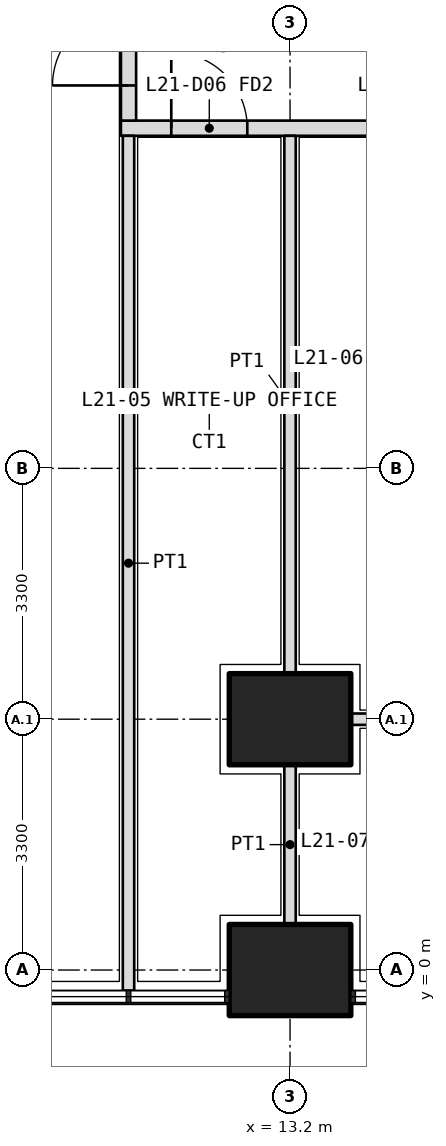
"""IFC4 building model, lengths in metres.
Left out: names, types, materials, properties, quantities, classifications, styles, units other than length and angle.
Written with IfcOpenShell. Run it as: python <this file> out.ifc"""

import sys

from ifc_helpers import new_model, si_unit, direction, frame, frame_2d, origin, origin_2d, place, context, subcontext, project, spatial, rectangle, extrude, element, fill, save


model = new_model("IFC4")
c1 = context("Model", 3, precision=1e-05, world=origin(), true_north=direction((0.0, 1.0)))
c2 = subcontext(c1, "Body", "Model", "MODEL_VIEW")
j1 = project(units=[si_unit("LENGTHUNIT", "METRE"), si_unit("PLANEANGLEUNIT", "RADIAN")], contexts=[c1])
p1 = place(None, origin())
s1 = spatial("IfcSite", under=j1, at=p1, CompositionType="ELEMENT")
p2 = place(p1, origin())
s2 = spatial("IfcBuilding", under=s1, at=p2, CompositionType="ELEMENT")
p3 = place(p2, frame((0.0, 0.0, 94.8)))
s3 = spatial("IfcBuildingStorey", under=s2, at=p3, CompositionType="ELEMENT", Elevation=94.8)
for number, where, z_axis, x_axis in (
    (1, (13.2, 0.0, 0.0), (0.0, 0.0, 1.0), (1.0, 0.0, 0.0)),
    (2, (13.2, 3.3, 0.0), (0.0, 0.0, 1.0), (1.0, 0.0, 0.0)),
):
    element("IfcColumn", number, at=place(p3, frame(where, z_axis=z_axis, x_axis=x_axis)), inside=s3, PredefinedType="COLUMN", context=c2, shape_type="SweptSolid", body=[
        extrude(rectangle(XDim=1.6, YDim=1.2, at=origin_2d()), origin(), (0.0, 0.0, 1.0), 4.2),
    ])
p4 = place(p3, frame((10.975, 11.075, 0.0), z_axis=(0.0, 0.0, 1.0), x_axis=(1.0, 0.0, 0.0)))
e3 = element("IfcWall", 3, at=p4, inside=s3, PredefinedType="PARTITIONING", context=c2, shape_type="SweptSolid", body=[
    extrude(rectangle(XDim=30.85, YDim=0.2, at=frame_2d((15.425, 0.0))), origin(), (0.0, 0.0, 1.0), 2.85),
])
p5 = place(p4, frame((0.663, 0.0, 0.0)))
e4 = element("IfcOpeningElement", 4, at=p5, cuts=e3, PredefinedType="OPENING", context=c2, shape_type="SweptSolid", body=[
    extrude(rectangle(XDim=1.0, YDim=2.1, at=frame_2d((0.5, 1.05))), frame((0.0, 0.11, 0.0), z_axis=(0.0, -1.0, 0.0), x_axis=(1.0, 0.0, 0.0)), (0.0, 0.0, 1.0), 0.22),
])
p6 = place(p4, frame((3.275, 0.0, 0.0)))
e5 = element("IfcOpeningElement", 5, at=p6, cuts=e3, PredefinedType="OPENING", context=c2, shape_type="SweptSolid", body=[
    extrude(rectangle(XDim=1.2, YDim=2.1, at=frame_2d((0.6, 1.05))), frame((0.0, 0.11, 0.0), z_axis=(0.0, -1.0, 0.0), x_axis=(1.0, 0.0, 0.0)), (0.0, 0.0, 1.0), 0.22),
])
p7 = place(p4, frame((8.325, 0.0, 0.0)))
e6 = element("IfcOpeningElement", 6, at=p7, cuts=e3, PredefinedType="OPENING", context=c2, shape_type="SweptSolid", body=[
    extrude(rectangle(XDim=1.0, YDim=2.1, at=frame_2d((0.5, 1.05))), frame((0.0, 0.11, 0.0), z_axis=(0.0, -1.0, 0.0), x_axis=(1.0, 0.0, 0.0)), (0.0, 0.0, 1.0), 0.22),
])
p8 = place(p4, frame((13.275, 0.0, 0.0)))
e7 = element("IfcOpeningElement", 7, at=p8, cuts=e3, PredefinedType="OPENING", context=c2, shape_type="SweptSolid", body=[
    extrude(rectangle(XDim=1.0, YDim=2.1, at=frame_2d((0.5, 1.05))), frame((0.0, 0.11, 0.0), z_axis=(0.0, -1.0, 0.0), x_axis=(1.0, 0.0, 0.0)), (0.0, 0.0, 1.0), 0.22),
])
p9 = place(p4, frame((16.625, 0.0, 0.0)))
e8 = element("IfcOpeningElement", 8, at=p9, cuts=e3, PredefinedType="OPENING", context=c2, shape_type="SweptSolid", body=[
    extrude(rectangle(XDim=1.0, YDim=2.1, at=frame_2d((0.5, 1.05))), frame((0.0, 0.11, 0.0), z_axis=(0.0, -1.0, 0.0), x_axis=(1.0, 0.0, 0.0)), (0.0, 0.0, 1.0), 0.22),
])
p10 = place(p4, frame((19.925, 0.0, 0.0)))
e9 = element("IfcOpeningElement", 9, at=p10, cuts=e3, PredefinedType="OPENING", context=c2, shape_type="SweptSolid", body=[
    extrude(rectangle(XDim=1.0, YDim=2.1, at=frame_2d((0.5, 1.05))), frame((0.0, 0.11, 0.0), z_axis=(0.0, -1.0, 0.0), x_axis=(1.0, 0.0, 0.0)), (0.0, 0.0, 1.0), 0.22),
])
p11 = place(p4, frame((25.887, 0.0, 0.0)))
e10 = element("IfcOpeningElement", 10, at=p11, cuts=e3, PredefinedType="OPENING", context=c2, shape_type="SweptSolid", body=[
    extrude(rectangle(XDim=1.0, YDim=2.1, at=frame_2d((0.5, 1.05))), frame((0.0, 0.11, 0.0), z_axis=(0.0, -1.0, 0.0), x_axis=(1.0, 0.0, 0.0)), (0.0, 0.0, 1.0), 0.22),
])
p12 = place(p3, frame((11.075, 11.175, 0.0), z_axis=(0.0, 0.0, 1.0), x_axis=(0.0, 1.0, 0.0)))
e11 = element("IfcWall", 11, at=p12, inside=s3, PredefinedType="PARTITIONING", context=c2, shape_type="SweptSolid", body=[
    extrude(rectangle(XDim=27.625, YDim=0.2, at=frame_2d((13.812, 0.0))), origin(), (0.0, 0.0, 1.0), 2.85),
])
p13 = place(p12, frame((0.462, 0.0, 0.0)))
e12 = element("IfcOpeningElement", 12, at=p13, cuts=e11, PredefinedType="OPENING", context=c2, shape_type="SweptSolid", body=[
    extrude(rectangle(XDim=1.0, YDim=2.1, at=frame_2d((0.5, 1.05))), frame((0.0, 0.11, 0.0), z_axis=(0.0, -1.0, 0.0), x_axis=(1.0, 0.0, 0.0)), (0.0, 0.0, 1.0), 0.22),
])
p14 = place(p12, frame((2.575, 0.0, 0.0)))
e13 = element("IfcOpeningElement", 13, at=p14, cuts=e11, PredefinedType="OPENING", context=c2, shape_type="SweptSolid", body=[
    extrude(rectangle(XDim=1.0, YDim=2.1, at=frame_2d((0.5, 1.05))), frame((0.0, 0.11, 0.0), z_axis=(0.0, -1.0, 0.0), x_axis=(1.0, 0.0, 0.0)), (0.0, 0.0, 1.0), 0.22),
])
p15 = place(p12, frame((5.65, 0.0, 0.0)))
e14 = element("IfcOpeningElement", 14, at=p15, cuts=e11, PredefinedType="OPENING", context=c2, shape_type="SweptSolid", body=[
    extrude(rectangle(XDim=0.9, YDim=2.1, at=frame_2d((0.45, 1.05))), frame((0.0, 0.11, 0.0), z_axis=(0.0, -1.0, 0.0), x_axis=(1.0, 0.0, 0.0)), (0.0, 0.0, 1.0), 0.22),
])
p16 = place(p12, frame((9.5, 0.0, 0.0)))
e15 = element("IfcOpeningElement", 15, at=p16, cuts=e11, PredefinedType="OPENING", context=c2, shape_type="SweptSolid", body=[
    extrude(rectangle(XDim=0.9, YDim=2.1, at=frame_2d((0.45, 1.05))), frame((0.0, 0.11, 0.0), z_axis=(0.0, -1.0, 0.0), x_axis=(1.0, 0.0, 0.0)), (0.0, 0.0, 1.0), 0.22),
])
p17 = place(p12, frame((13.025, 0.0, 0.0)))
e16 = element("IfcOpeningElement", 16, at=p17, cuts=e11, PredefinedType="OPENING", context=c2, shape_type="SweptSolid", body=[
    extrude(rectangle(XDim=1.0, YDim=2.1, at=frame_2d((0.5, 1.05))), frame((0.0, 0.11, 0.0), z_axis=(0.0, -1.0, 0.0), x_axis=(1.0, 0.0, 0.0)), (0.0, 0.0, 1.0), 0.22),
])
p18 = place(p12, frame((20.975, 0.0, 0.0)))
e17 = element("IfcOpeningElement", 17, at=p18, cuts=e11, PredefinedType="OPENING", context=c2, shape_type="SweptSolid", body=[
    extrude(rectangle(XDim=1.0, YDim=2.1, at=frame_2d((0.5, 1.05))), frame((0.0, 0.11, 0.0), z_axis=(0.0, -1.0, 0.0), x_axis=(1.0, 0.0, 0.0)), (0.0, 0.0, 1.0), 0.22),
])
p19 = place(p3, frame((11.075, -0.27, 0.0), z_axis=(0.0, 0.0, 1.0), x_axis=(0.0, 1.0, 0.0)))
e18 = element("IfcWall", 18, at=p19, inside=s3, PredefinedType="PARTITIONING", context=c2, shape_type="SweptSolid", body=[
    extrude(rectangle(XDim=11.245, YDim=0.15, at=frame_2d((5.623, 0.0))), origin(), (0.0, 0.0, 1.0), 2.7),
])
p20 = place(p3, frame((14.0, 3.3, 0.0), z_axis=(0.0, 0.0, 1.0), x_axis=(1.0, 0.0, 0.0)))
e19 = element("IfcWall", 19, at=p20, inside=s3, PredefinedType="PARTITIONING", context=c2, shape_type="SweptSolid", body=[
    extrude(rectangle(XDim=5.0, YDim=0.15, at=frame_2d((2.5, 0.0))), origin(), (0.0, 0.0, 1.0), 3.9),
])
p21 = place(p20, frame((0.35, 0.0, 0.0)))
e20 = element("IfcOpeningElement", 20, at=p21, cuts=e19, PredefinedType="OPENING", context=c2, shape_type="SweptSolid", body=[
    extrude(rectangle(XDim=1.0, YDim=2.1, at=frame_2d((0.5, 1.05))), frame((0.0, 0.085, 0.0), z_axis=(0.0, -1.0, 0.0), x_axis=(1.0, 0.0, 0.0)), (0.0, 0.0, 1.0), 0.17),
])
p22 = place(p20, frame((3.75, 0.0, 0.0)))
e21 = element("IfcOpeningElement", 21, at=p22, cuts=e19, PredefinedType="OPENING", context=c2, shape_type="SweptSolid", body=[
    extrude(rectangle(XDim=1.0, YDim=2.1, at=frame_2d((0.5, 1.05))), frame((0.0, 0.085, 0.0), z_axis=(0.0, -1.0, 0.0), x_axis=(1.0, 0.0, 0.0)), (0.0, 0.0, 1.0), 0.17),
])
p23 = place(p3, frame((13.2, 0.6, 0.0), z_axis=(0.0, 0.0, 1.0), x_axis=(0.0, 1.0, 0.0)))
e22 = element("IfcWall", 22, at=p23, inside=s3, PredefinedType="PARTITIONING", context=c2, shape_type="SweptSolid", body=[
    extrude(rectangle(XDim=2.1, YDim=0.15, at=frame_2d((1.05, 0.0))), origin(), (0.0, 0.0, 1.0), 2.85),
])
p24 = place(p3, frame((13.2, 3.9, 0.0), z_axis=(0.0, 0.0, 1.0), x_axis=(0.0, 1.0, 0.0)))
e23 = element("IfcWall", 23, at=p24, inside=s3, PredefinedType="PARTITIONING", context=c2, shape_type="SweptSolid", body=[
    extrude(rectangle(XDim=7.075, YDim=0.15, at=frame_2d((3.538, 0.0))), origin(), (0.0, 0.0, 1.0), 2.85),
])
p25 = place(p5, origin())
e24 = element("IfcDoor", 24, at=p25, inside=s3, OperationType="SINGLE_SWING_LEFT", PredefinedType="DOOR", context=c2, shape_type="SweptSolid", body=[
    extrude(rectangle(XDim=1.0, YDim=2.1, at=frame_2d((0.5, 1.05))), frame((0.0, 0.025, 0.0), z_axis=(0.0, -1.0, 0.0), x_axis=(1.0, 0.0, 0.0)), (0.0, 0.0, 1.0), 0.05),
])
fill(e4, e24)
p26 = place(p13, origin())
e25 = element("IfcDoor", 25, at=p26, inside=s3, OperationType="SINGLE_SWING_LEFT", PredefinedType="DOOR", context=c2, shape_type="SweptSolid", body=[
    extrude(rectangle(XDim=1.0, YDim=2.1, at=frame_2d((0.5, 1.05))), frame((0.0, 0.025, 0.0), z_axis=(0.0, -1.0, 0.0), x_axis=(1.0, 0.0, 0.0)), (0.0, 0.0, 1.0), 0.05),
])
fill(e12, e25)
save(model, sys.argv[1])
